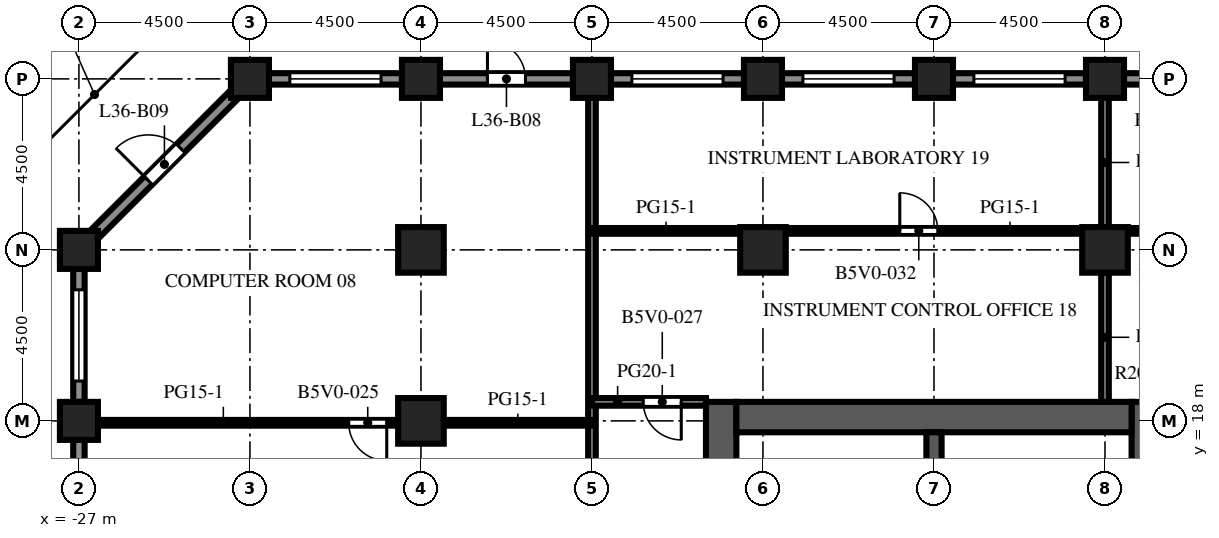
"""IFC4 building model, lengths in metres.
Left out: names, types, materials, properties, quantities, classifications, styles, units other than length and angle.
Written with IfcOpenShell. Run it as: python <this file> out.ifc"""

import sys

from ifc_helpers import new_model, si_unit, direction, frame, frame_2d, origin, origin_2d, place, context, subcontext, project, spatial, rectangle, extrude, element, fill, save


model = new_model("IFC4")
c1 = context("Model", 3, precision=1e-05, world=origin(), true_north=direction((0.0, 1.0)))
c2 = subcontext(c1, "Body", "Model", "MODEL_VIEW")
j1 = project(units=[si_unit("LENGTHUNIT", "METRE"), si_unit("PLANEANGLEUNIT", "RADIAN")], contexts=[c1])
p1 = place(None, origin())
s1 = spatial("IfcSite", under=j1, at=p1, CompositionType="ELEMENT")
p2 = place(p1, origin())
s2 = spatial("IfcBuilding", under=s1, at=p2, CompositionType="ELEMENT")
p3 = place(p2, frame((0.0, 0.0, 160.9)))
s3 = spatial("IfcBuildingStorey", under=s2, at=p3, CompositionType="ELEMENT", Elevation=160.9)
for number, where, z_axis, x_axis in (
    (1, (-27.0, 18.0, 0.0), (0.0, 0.0, 1.0), (1.0, 0.0, 0.0)),
    (2, (-27.0, 22.5, 0.0), (0.0, 0.0, 1.0), (1.0, 0.0, 0.0)),
    (3, (-22.5, 27.0, 0.0), (0.0, 0.0, 1.0), (1.0, 0.0, 0.0)),
    (4, (-18.0, 27.0, 0.0), (0.0, 0.0, 1.0), (1.0, 0.0, 0.0)),
    (5, (-13.5, 27.0, 0.0), (0.0, 0.0, 1.0), (1.0, 0.0, 0.0)),
    (6, (-9.0, 27.0, 0.0), (0.0, 0.0, 1.0), (1.0, 0.0, 0.0)),
    (7, (-4.5, 27.0, 0.0), (0.0, 0.0, 1.0), (1.0, 0.0, 0.0)),
    (8, (0.0, 27.0, 0.0), (0.0, 0.0, 1.0), (1.0, 0.0, 0.0)),
):
    element("IfcColumn", number, at=place(p3, frame(where, z_axis=z_axis, x_axis=x_axis)), inside=s3, PredefinedType="COLUMN", context=c2, shape_type="SweptSolid", body=[
        extrude(rectangle(XDim=1.0, YDim=1.0, at=origin_2d()), origin(), (0.0, 0.0, 1.0), 4.1),
    ])
for number, where, z_axis, x_axis in (
    (9, (-18.0, 18.0, 0.0), (0.0, 0.0, 1.0), (1.0, 0.0, 0.0)),
    (10, (-18.0, 22.5, 0.0), (0.0, 0.0, 1.0), (1.0, 0.0, 0.0)),
    (11, (-9.0, 22.5, 0.0), (0.0, 0.0, 1.0), (1.0, 0.0, 0.0)),
    (12, (0.0, 22.5, 0.0), (0.0, 0.0, 1.0), (1.0, 0.0, 0.0)),
):
    element("IfcColumn", number, at=place(p3, frame(where, z_axis=z_axis, x_axis=x_axis)), inside=s3, PredefinedType="COLUMN", context=c2, shape_type="SweptSolid", body=[
        extrude(rectangle(XDim=1.2, YDim=1.2, at=origin_2d()), origin(), (0.0, 0.0, 1.0), 4.1),
    ])
p4 = place(p3, frame((-10.1, -9.0, 0.0), z_axis=(0.0, 0.0, 1.0), x_axis=(0.0, 1.0, 0.0)))
e13 = element("IfcWall", 13, at=p4, inside=s3, PredefinedType="SHEAR", context=c2, shape_type="SweptSolid", body=[
    extrude(rectangle(XDim=27.5, YDim=0.8, at=frame_2d((13.75, 0.0))), origin(), (0.0, 0.0, 1.0), 4.1),
])
p5 = place(p4, frame((12.55, 0.0, 0.0)))
e14 = element("IfcOpeningElement", 14, at=p5, cuts=e13, PredefinedType="OPENING", context=c2, shape_type="SweptSolid", body=[
    extrude(rectangle(XDim=2.4, YDim=2.4, at=frame_2d((1.2, 1.2))), frame((0.0, 0.41, 0.0), z_axis=(0.0, -1.0, 0.0), x_axis=(1.0, 0.0, 0.0)), (0.0, 0.0, 1.0), 0.82),
])
p6 = place(p4, frame((6.825, 0.0, 0.0)))
e15 = element("IfcOpeningElement", 15, at=p6, cuts=e13, PredefinedType="OPENING", context=c2, shape_type="SweptSolid", body=[
    extrude(rectangle(XDim=1.2, YDim=2.1, at=frame_2d((0.6, 1.05))), frame((0.0, 0.41, 0.0), z_axis=(0.0, -1.0, 0.0), x_axis=(1.0, 0.0, 0.0)), (0.0, 0.0, 1.0), 0.82),
])
p7 = place(p4, frame((19.475, 0.0, 0.0)))
e16 = element("IfcOpeningElement", 16, at=p7, cuts=e13, PredefinedType="OPENING", context=c2, shape_type="SweptSolid", body=[
    extrude(rectangle(XDim=1.2, YDim=2.1, at=frame_2d((0.6, 1.05))), frame((0.0, 0.41, 0.0), z_axis=(0.0, -1.0, 0.0), x_axis=(1.0, 0.0, 0.0)), (0.0, 0.0, 1.0), 0.82),
])
p8 = place(p3, frame((1.1, -9.0, 0.0), z_axis=(0.0, 0.0, 1.0), x_axis=(0.0, 1.0, 0.0)))
e17 = element("IfcWall", 17, at=p8, inside=s3, PredefinedType="SHEAR", context=c2, shape_type="SweptSolid", body=[
    extrude(rectangle(XDim=27.5, YDim=0.8, at=frame_2d((13.75, 0.0))), origin(), (0.0, 0.0, 1.0), 4.1),
])
p9 = place(p8, frame((12.55, 0.0, 0.0)))
e18 = element("IfcOpeningElement", 18, at=p9, cuts=e17, PredefinedType="OPENING", context=c2, shape_type="SweptSolid", body=[
    extrude(rectangle(XDim=2.4, YDim=2.4, at=frame_2d((1.2, 1.2))), frame((0.0, 0.41, 0.0), z_axis=(0.0, -1.0, 0.0), x_axis=(1.0, 0.0, 0.0)), (0.0, 0.0, 1.0), 0.82),
])
p10 = place(p8, frame((5.45, 0.0, 0.0)))
e19 = element("IfcOpeningElement", 19, at=p10, cuts=e17, PredefinedType="OPENING", context=c2, shape_type="SweptSolid", body=[
    extrude(rectangle(XDim=1.2, YDim=2.1, at=frame_2d((0.6, 1.05))), frame((0.0, 0.41, 0.0), z_axis=(0.0, -1.0, 0.0), x_axis=(1.0, 0.0, 0.0)), (0.0, 0.0, 1.0), 0.82),
])
p11 = place(p8, frame((19.45, 0.0, 0.0)))
e20 = element("IfcOpeningElement", 20, at=p11, cuts=e17, PredefinedType="OPENING", context=c2, shape_type="SweptSolid", body=[
    extrude(rectangle(XDim=1.0, YDim=2.1, at=frame_2d((0.5, 1.05))), frame((0.0, 0.41, 0.0), z_axis=(0.0, -1.0, 0.0), x_axis=(1.0, 0.0, 0.0)), (0.0, 0.0, 1.0), 0.82),
])
p12 = place(p8, frame((21.137, 0.0, 0.0)))
e21 = element("IfcOpeningElement", 21, at=p12, cuts=e17, PredefinedType="OPENING", context=c2, shape_type="SweptSolid", body=[
    extrude(rectangle(XDim=1.0, YDim=2.1, at=frame_2d((0.5, 1.05))), frame((0.0, 0.41, 0.0), z_axis=(0.0, -1.0, 0.0), x_axis=(1.0, 0.0, 0.0)), (0.0, 0.0, 1.0), 0.82),
])
p13 = place(p8, frame((23.2, 0.0, 0.0)))
e22 = element("IfcOpeningElement", 22, at=p13, cuts=e17, PredefinedType="OPENING", context=c2, shape_type="SweptSolid", body=[
    extrude(rectangle(XDim=1.0, YDim=2.1, at=frame_2d((0.5, 1.05))), frame((0.0, 0.41, 0.0), z_axis=(0.0, -1.0, 0.0), x_axis=(1.0, 0.0, 0.0)), (0.0, 0.0, 1.0), 0.82),
])
p14 = place(p8, frame((25.262, 0.0, 0.0)))
e23 = element("IfcOpeningElement", 23, at=p14, cuts=e17, PredefinedType="OPENING", context=c2, shape_type="SweptSolid", body=[
    extrude(rectangle(XDim=1.0, YDim=2.1, at=frame_2d((0.5, 1.05))), frame((0.0, 0.41, 0.0), z_axis=(0.0, -1.0, 0.0), x_axis=(1.0, 0.0, 0.0)), (0.0, 0.0, 1.0), 0.82),
])
p15 = place(p3, frame((-9.7, 18.1, 0.0), z_axis=(0.0, 0.0, 1.0), x_axis=(1.0, 0.0, 0.0)))
e24 = element("IfcWall", 24, at=p15, inside=s3, PredefinedType="SHEAR", context=c2, shape_type="SweptSolid", body=[
    extrude(rectangle(XDim=10.4, YDim=0.8, at=frame_2d((5.2, 0.0))), origin(), (0.0, 0.0, 1.0), 4.1),
])
p16 = place(p3, frame((-4.5, 10.2, 0.0), z_axis=(0.0, 0.0, 1.0), x_axis=(0.0, 1.0, 0.0)))
e25 = element("IfcWall", 25, at=p16, inside=s3, PredefinedType="SHEAR", context=c2, shape_type="SweptSolid", body=[
    extrude(rectangle(XDim=7.5, YDim=0.4, at=frame_2d((3.75, 0.0))), origin(), (0.0, 0.0, 1.0), 4.1),
])
p17 = place(p3, frame((0.5, 27.0, 0.0), z_axis=(0.0, 0.0, 1.0), x_axis=(1.0, 0.0, 0.0)))
e26 = element("IfcWall", 26, at=p17, inside=s3, PredefinedType="SOLIDWALL", context=c2, shape_type="SweptSolid", body=[
    extrude(rectangle(XDim=3.5, YDim=0.3, at=frame_2d((1.75, 0.0))), origin(), (0.0, 0.0, 1.0), 2.85),
])
p18 = place(p17, frame((0.55, 0.0, 0.8)))
e27 = element("IfcOpeningElement", 27, at=p18, cuts=e26, PredefinedType="OPENING", context=c2, shape_type="SweptSolid", body=[
    extrude(rectangle(XDim=2.4, YDim=1.7, at=frame_2d((1.2, 0.85))), frame((0.0, 0.16, 0.0), z_axis=(0.0, -1.0, 0.0), x_axis=(1.0, 0.0, 0.0)), (0.0, 0.0, 1.0), 0.32),
])
p19 = place(p3, frame((-4.0, 27.0, 0.0), z_axis=(0.0, 0.0, 1.0), x_axis=(1.0, 0.0, 0.0)))
e28 = element("IfcWall", 28, at=p19, inside=s3, PredefinedType="SOLIDWALL", context=c2, shape_type="SweptSolid", body=[
    extrude(rectangle(XDim=3.5, YDim=0.3, at=frame_2d((1.75, 0.0))), origin(), (0.0, 0.0, 1.0), 2.85),
])
p20 = place(p19, frame((0.55, 0.0, 0.8)))
e29 = element("IfcOpeningElement", 29, at=p20, cuts=e28, PredefinedType="OPENING", context=c2, shape_type="SweptSolid", body=[
    extrude(rectangle(XDim=2.4, YDim=1.7, at=frame_2d((1.2, 0.85))), frame((0.0, 0.16, 0.0), z_axis=(0.0, -1.0, 0.0), x_axis=(1.0, 0.0, 0.0)), (0.0, 0.0, 1.0), 0.32),
])
p21 = place(p3, frame((-8.5, 27.0, 0.0), z_axis=(0.0, 0.0, 1.0), x_axis=(1.0, 0.0, 0.0)))
e30 = element("IfcWall", 30, at=p21, inside=s3, PredefinedType="SOLIDWALL", context=c2, shape_type="SweptSolid", body=[
    extrude(rectangle(XDim=3.5, YDim=0.3, at=frame_2d((1.75, 0.0))), origin(), (0.0, 0.0, 1.0), 2.85),
])
p22 = place(p21, frame((0.55, 0.0, 0.8)))
e31 = element("IfcOpeningElement", 31, at=p22, cuts=e30, PredefinedType="OPENING", context=c2, shape_type="SweptSolid", body=[
    extrude(rectangle(XDim=2.4, YDim=1.7, at=frame_2d((1.2, 0.85))), frame((0.0, 0.16, 0.0), z_axis=(0.0, -1.0, 0.0), x_axis=(1.0, 0.0, 0.0)), (0.0, 0.0, 1.0), 0.32),
])
p23 = place(p3, frame((-13.0, 27.0, 0.0), z_axis=(0.0, 0.0, 1.0), x_axis=(1.0, 0.0, 0.0)))
e32 = element("IfcWall", 32, at=p23, inside=s3, PredefinedType="SOLIDWALL", context=c2, shape_type="SweptSolid", body=[
    extrude(rectangle(XDim=3.5, YDim=0.3, at=frame_2d((1.75, 0.0))), origin(), (0.0, 0.0, 1.0), 2.85),
])
p24 = place(p23, frame((0.55, 0.0, 0.8)))
e33 = element("IfcOpeningElement", 33, at=p24, cuts=e32, PredefinedType="OPENING", context=c2, shape_type="SweptSolid", body=[
    extrude(rectangle(XDim=2.4, YDim=1.7, at=frame_2d((1.2, 0.85))), frame((0.0, 0.16, 0.0), z_axis=(0.0, -1.0, 0.0), x_axis=(1.0, 0.0, 0.0)), (0.0, 0.0, 1.0), 0.32),
])
p25 = place(p3, frame((-17.5, 27.0, 0.0), z_axis=(0.0, 0.0, 1.0), x_axis=(1.0, 0.0, 0.0)))
e34 = element("IfcWall", 34, at=p25, inside=s3, PredefinedType="SOLIDWALL", context=c2, shape_type="SweptSolid", body=[
    extrude(rectangle(XDim=3.5, YDim=0.3, at=frame_2d((1.75, 0.0))), origin(), (0.0, 0.0, 1.0), 2.85),
])
p26 = place(p25, frame((1.25, 0.0, 0.0)))
e35 = element("IfcOpeningElement", 35, at=p26, cuts=e34, PredefinedType="OPENING", context=c2, shape_type="SweptSolid", body=[
    extrude(rectangle(XDim=1.0, YDim=2.2, at=frame_2d((0.5, 1.1))), frame((0.0, 0.16, 0.0), z_axis=(0.0, -1.0, 0.0), x_axis=(1.0, 0.0, 0.0)), (0.0, 0.0, 1.0), 0.32),
])
p27 = place(p3, frame((-22.0, 27.0, 0.0), z_axis=(0.0, 0.0, 1.0), x_axis=(1.0, 0.0, 0.0)))
e36 = element("IfcWall", 36, at=p27, inside=s3, PredefinedType="SOLIDWALL", context=c2, shape_type="SweptSolid", body=[
    extrude(rectangle(XDim=3.5, YDim=0.3, at=frame_2d((1.75, 0.0))), origin(), (0.0, 0.0, 1.0), 2.85),
])
p28 = place(p27, frame((0.55, 0.0, 0.8)))
e37 = element("IfcOpeningElement", 37, at=p28, cuts=e36, PredefinedType="OPENING", context=c2, shape_type="SweptSolid", body=[
    extrude(rectangle(XDim=2.4, YDim=1.7, at=frame_2d((1.2, 0.85))), frame((0.0, 0.16, 0.0), z_axis=(0.0, -1.0, 0.0), x_axis=(1.0, 0.0, 0.0)), (0.0, 0.0, 1.0), 0.32),
])
p29 = place(p3, frame((-26.606, 22.894, 0.0), z_axis=(0.0, 0.0, 1.0), x_axis=(0.707106781187, 0.707106781187, 0.0)))
e38 = element("IfcWall", 38, at=p29, inside=s3, PredefinedType="SOLIDWALL", context=c2, shape_type="SweptSolid", body=[
    extrude(rectangle(XDim=5.25, YDim=0.3, at=frame_2d((2.625, 0.0))), origin(), (0.0, 0.0, 1.0), 2.85),
])
p30 = place(p29, frame((2.025, 0.0, 0.0)))
e39 = element("IfcOpeningElement", 39, at=p30, cuts=e38, PredefinedType="OPENING", context=c2, shape_type="SweptSolid", body=[
    extrude(rectangle(XDim=1.2, YDim=2.2, at=frame_2d((0.6, 1.1))), frame((0.0, 0.16, 0.0), z_axis=(0.0, -1.0, 0.0), x_axis=(1.0, 0.0, 0.0)), (0.0, 0.0, 1.0), 0.32),
])
p31 = place(p3, frame((-27.0, 18.5, 0.0), z_axis=(0.0, 0.0, 1.0), x_axis=(0.0, 1.0, 0.0)))
e40 = element("IfcWall", 40, at=p31, inside=s3, PredefinedType="SOLIDWALL", context=c2, shape_type="SweptSolid", body=[
    extrude(rectangle(XDim=3.5, YDim=0.3, at=frame_2d((1.75, 0.0))), origin(), (0.0, 0.0, 1.0), 2.85),
])
p32 = place(p31, frame((0.55, 0.0, 0.8)))
e41 = element("IfcOpeningElement", 41, at=p32, cuts=e40, PredefinedType="OPENING", context=c2, shape_type="SweptSolid", body=[
    extrude(rectangle(XDim=2.4, YDim=1.7, at=frame_2d((1.2, 0.85))), frame((0.0, 0.16, 0.0), z_axis=(0.0, -1.0, 0.0), x_axis=(1.0, 0.0, 0.0)), (0.0, 0.0, 1.0), 0.32),
])
p33 = place(p3, frame((-27.0, 14.0, 0.0), z_axis=(0.0, 0.0, 1.0), x_axis=(0.0, 1.0, 0.0)))
e42 = element("IfcWall", 42, at=p33, inside=s3, PredefinedType="SOLIDWALL", context=c2, shape_type="SweptSolid", body=[
    extrude(rectangle(XDim=3.5, YDim=0.3, at=frame_2d((1.75, 0.0))), origin(), (0.0, 0.0, 1.0), 2.85),
])
p34 = place(p33, frame((1.25, 0.0, 0.0)))
e43 = element("IfcOpeningElement", 43, at=p34, cuts=e42, PredefinedType="OPENING", context=c2, shape_type="SweptSolid", body=[
    extrude(rectangle(XDim=1.0, YDim=2.2, at=frame_2d((0.5, 1.1))), frame((0.0, 0.16, 0.0), z_axis=(0.0, -1.0, 0.0), x_axis=(1.0, 0.0, 0.0)), (0.0, 0.0, 1.0), 0.32),
])
p35 = place(p3, frame((-13.5, 6.25, 0.0), z_axis=(0.0, 0.0, 1.0), x_axis=(0.0, 1.0, 0.0)))
e44 = element("IfcWall", 44, at=p35, inside=s3, PredefinedType="PARTITIONING", context=c2, shape_type="SweptSolid", body=[
    extrude(rectangle(XDim=20.25, YDim=0.2, at=frame_2d((10.125, 0.0))), origin(), (0.0, 0.0, 1.0), 3.65),
])
for number, where, z_axis, x_axis in (
    (45, (0.0, 18.5, 0.0), (0.0, 0.0, 1.0), (0.0, 1.0, 0.0)),
    (46, (0.0, 23.1, 0.0), (0.0, 0.0, 1.0), (0.0, 1.0, 0.0)),
):
    element("IfcWall", number, at=place(p3, frame(where, z_axis=z_axis, x_axis=x_axis)), inside=s3, PredefinedType="PARTITIONING", context=c2, shape_type="SweptSolid", body=[
        extrude(rectangle(XDim=3.4, YDim=0.2, at=frame_2d((1.7, 0.0))), origin(), (0.0, 0.0, 1.0), 3.65),
    ])
p36 = place(p3, frame((-26.5, 17.95, 0.0), z_axis=(0.0, 0.0, 1.0), x_axis=(1.0, 0.0, 0.0)))
e47 = element("IfcWall", 47, at=p36, inside=s3, PredefinedType="PARTITIONING", context=c2, shape_type="SweptSolid", body=[
    extrude(rectangle(XDim=7.9, YDim=0.15, at=frame_2d((3.95, 0.0))), origin(), (0.0, 0.0, 1.0), 3.65),
])
p37 = place(p36, frame((6.6, 0.0, 0.0)))
e48 = element("IfcOpeningElement", 48, at=p37, cuts=e47, PredefinedType="OPENING", context=c2, shape_type="SweptSolid", body=[
    extrude(rectangle(XDim=1.0, YDim=2.1, at=frame_2d((0.5, 1.05))), frame((0.0, 0.085, 0.0), z_axis=(0.0, -1.0, 0.0), x_axis=(1.0, 0.0, 0.0)), (0.0, 0.0, 1.0), 0.17),
])
p38 = place(p3, frame((-17.4, 17.95, 0.0), z_axis=(0.0, 0.0, 1.0), x_axis=(1.0, 0.0, 0.0)))
e49 = element("IfcWall", 49, at=p38, inside=s3, PredefinedType="PARTITIONING", context=c2, shape_type="SweptSolid", body=[
    extrude(rectangle(XDim=3.9, YDim=0.15, at=frame_2d((1.95, 0.0))), origin(), (0.0, 0.0, 1.0), 3.65),
])
p39 = place(p3, frame((-13.5, 18.5, 0.0), z_axis=(0.0, 0.0, 1.0), x_axis=(1.0, 0.0, 0.0)))
e50 = element("IfcWall", 50, at=p39, inside=s3, PredefinedType="PARTITIONING", context=c2, shape_type="SweptSolid", body=[
    extrude(rectangle(XDim=3.0, YDim=0.2, at=frame_2d((1.5, 0.0))), origin(), (0.0, 0.0, 1.0), 3.65),
])
p40 = place(p39, frame((1.35, 0.0, 0.0)))
e51 = element("IfcOpeningElement", 51, at=p40, cuts=e50, PredefinedType="OPENING", context=c2, shape_type="SweptSolid", body=[
    extrude(rectangle(XDim=1.0, YDim=2.1, at=frame_2d((0.5, 1.05))), frame((0.0, 0.11, 0.0), z_axis=(0.0, -1.0, 0.0), x_axis=(1.0, 0.0, 0.0)), (0.0, 0.0, 1.0), 0.22),
])
p41 = place(p3, frame((-13.5, 23.0, 0.0), z_axis=(0.0, 0.0, 1.0), x_axis=(1.0, 0.0, 0.0)))
e52 = element("IfcWall", 52, at=p41, inside=s3, PredefinedType="PARTITIONING", context=c2, shape_type="SweptSolid", body=[
    extrude(rectangle(XDim=3.9, YDim=0.15, at=frame_2d((1.95, 0.0))), origin(), (0.0, 0.0, 1.0), 3.65),
])
p42 = place(p3, frame((-8.4, 23.0, 0.0), z_axis=(0.0, 0.0, 1.0), x_axis=(1.0, 0.0, 0.0)))
e53 = element("IfcWall", 53, at=p42, inside=s3, PredefinedType="PARTITIONING", context=c2, shape_type="SweptSolid", body=[
    extrude(rectangle(XDim=7.8, YDim=0.15, at=frame_2d((3.9, 0.0))), origin(), (0.0, 0.0, 1.0), 3.65),
])
p43 = place(p42, frame((3.0, 0.0, 0.0)))
e54 = element("IfcOpeningElement", 54, at=p43, cuts=e53, PredefinedType="OPENING", context=c2, shape_type="SweptSolid", body=[
    extrude(rectangle(XDim=1.0, YDim=2.1, at=frame_2d((0.5, 1.05))), frame((0.0, 0.085, 0.0), z_axis=(0.0, -1.0, 0.0), x_axis=(1.0, 0.0, 0.0)), (0.0, 0.0, 1.0), 0.17),
])
p44 = place(p3, frame((0.6, 23.0, 0.0), z_axis=(0.0, 0.0, 1.0), x_axis=(1.0, 0.0, 0.0)))
e55 = element("IfcWall", 55, at=p44, inside=s3, PredefinedType="PARTITIONING", context=c2, shape_type="SweptSolid", body=[
    extrude(rectangle(XDim=7.8, YDim=0.15, at=frame_2d((3.9, 0.0))), origin(), (0.0, 0.0, 1.0), 3.65),
])
p45 = place(p44, frame((0.75, 0.0, 0.0)))
e56 = element("IfcOpeningElement", 56, at=p45, cuts=e55, PredefinedType="OPENING", context=c2, shape_type="SweptSolid", body=[
    extrude(rectangle(XDim=1.0, YDim=2.1, at=frame_2d((0.5, 1.05))), frame((0.0, 0.085, 0.0), z_axis=(0.0, -1.0, 0.0), x_axis=(1.0, 0.0, 0.0)), (0.0, 0.0, 1.0), 0.17),
])
p46 = place(p20, origin())
e57 = element("IfcWindow", 57, at=p46, inside=s3, PartitioningType="SINGLE_PANEL", PredefinedType="WINDOW", context=c2, shape_type="SweptSolid", body=[
    extrude(rectangle(XDim=2.4, YDim=1.7, at=frame_2d((1.2, 0.85))), frame((0.0, 0.03, 0.0), z_axis=(0.0, -1.0, 0.0), x_axis=(1.0, 0.0, 0.0)), (0.0, 0.0, 1.0), 0.06),
])
fill(e29, e57)
p47 = place(p22, origin())
e58 = element("IfcWindow", 58, at=p47, inside=s3, PartitioningType="SINGLE_PANEL", PredefinedType="WINDOW", context=c2, shape_type="SweptSolid", body=[
    extrude(rectangle(XDim=2.4, YDim=1.7, at=frame_2d((1.2, 0.85))), frame((0.0, 0.03, 0.0), z_axis=(0.0, -1.0, 0.0), x_axis=(1.0, 0.0, 0.0)), (0.0, 0.0, 1.0), 0.06),
])
fill(e31, e58)
p48 = place(p24, origin())
e59 = element("IfcWindow", 59, at=p48, inside=s3, PartitioningType="SINGLE_PANEL", PredefinedType="WINDOW", context=c2, shape_type="SweptSolid", body=[
    extrude(rectangle(XDim=2.4, YDim=1.7, at=frame_2d((1.2, 0.85))), frame((0.0, 0.03, 0.0), z_axis=(0.0, -1.0, 0.0), x_axis=(1.0, 0.0, 0.0)), (0.0, 0.0, 1.0), 0.06),
])
fill(e33, e59)
p49 = place(p26, origin())
e60 = element("IfcDoor", 60, at=p49, inside=s3, OperationType="SINGLE_SWING_LEFT", PredefinedType="DOOR", context=c2, shape_type="SweptSolid", body=[
    extrude(rectangle(XDim=1.0, YDim=2.2, at=frame_2d((0.5, 1.1))), frame((0.0, 0.025, 0.0), z_axis=(0.0, -1.0, 0.0), x_axis=(1.0, 0.0, 0.0)), (0.0, 0.0, 1.0), 0.05),
])
fill(e35, e60)
p50 = place(p28, origin())
e61 = element("IfcWindow", 61, at=p50, inside=s3, PartitioningType="SINGLE_PANEL", PredefinedType="WINDOW", context=c2, shape_type="SweptSolid", body=[
    extrude(rectangle(XDim=2.4, YDim=1.7, at=frame_2d((1.2, 0.85))), frame((0.0, 0.03, 0.0), z_axis=(0.0, -1.0, 0.0), x_axis=(1.0, 0.0, 0.0)), (0.0, 0.0, 1.0), 0.06),
])
fill(e37, e61)
p51 = place(p30, origin())
e62 = element("IfcDoor", 62, at=p51, inside=s3, OperationType="SINGLE_SWING_LEFT", PredefinedType="DOOR", context=c2, shape_type="SweptSolid", body=[
    extrude(rectangle(XDim=1.2, YDim=2.2, at=frame_2d((0.6, 1.1))), frame((0.0, 0.025, 0.0), z_axis=(0.0, -1.0, 0.0), x_axis=(1.0, 0.0, 0.0)), (0.0, 0.0, 1.0), 0.05),
])
fill(e39, e62)
p52 = place(p32, origin())
e63 = element("IfcWindow", 63, at=p52, inside=s3, PartitioningType="SINGLE_PANEL", PredefinedType="WINDOW", context=c2, shape_type="SweptSolid", body=[
    extrude(rectangle(XDim=2.4, YDim=1.7, at=frame_2d((1.2, 0.85))), frame((0.0, 0.03, 0.0), z_axis=(0.0, -1.0, 0.0), x_axis=(1.0, 0.0, 0.0)), (0.0, 0.0, 1.0), 0.06),
])
fill(e41, e63)
p53 = place(p14, origin())
e64 = element("IfcDoor", 64, at=p53, inside=s3, OperationType="SINGLE_SWING_RIGHT", PredefinedType="DOOR", context=c2, shape_type="SweptSolid", body=[
    extrude(rectangle(XDim=1.0, YDim=2.1, at=frame_2d((0.5, 1.05))), frame((0.0, 0.375, 0.0), z_axis=(0.0, -1.0, 0.0), x_axis=(1.0, 0.0, 0.0)), (0.0, 0.0, 1.0), 0.05),
])
fill(e23, e64)
p54 = place(p37, origin())
e65 = element("IfcDoor", 65, at=p54, inside=s3, OperationType="SINGLE_SWING_RIGHT", PredefinedType="DOOR", context=c2, shape_type="SweptSolid", body=[
    extrude(rectangle(XDim=1.0, YDim=2.1, at=frame_2d((0.5, 1.05))), frame((0.0, 0.025, 0.0), z_axis=(0.0, -1.0, 0.0), x_axis=(1.0, 0.0, 0.0)), (0.0, 0.0, 1.0), 0.05),
])
fill(e48, e65)
p55 = place(p40, origin())
e66 = element("IfcDoor", 66, at=p55, inside=s3, OperationType="SINGLE_SWING_RIGHT", PredefinedType="DOOR", context=c2, shape_type="SweptSolid", body=[
    extrude(rectangle(XDim=1.0, YDim=2.1, at=frame_2d((0.5, 1.05))), frame((0.0, 0.025, 0.0), z_axis=(0.0, -1.0, 0.0), x_axis=(1.0, 0.0, 0.0)), (0.0, 0.0, 1.0), 0.05),
])
fill(e51, e66)
p56 = place(p43, origin())
e67 = element("IfcDoor", 67, at=p56, inside=s3, OperationType="SINGLE_SWING_LEFT", PredefinedType="DOOR", context=c2, shape_type="SweptSolid", body=[
    extrude(rectangle(XDim=1.0, YDim=2.1, at=frame_2d((0.5, 1.05))), frame((0.0, 0.025, 0.0), z_axis=(0.0, -1.0, 0.0), x_axis=(1.0, 0.0, 0.0)), (0.0, 0.0, 1.0), 0.05),
])
fill(e54, e67)
save(model, sys.argv[1])
